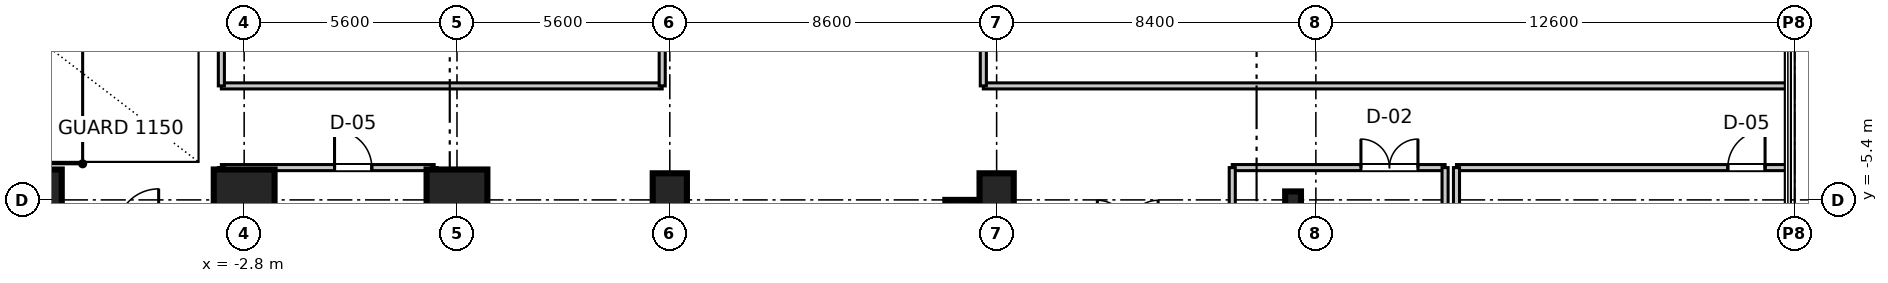
"""IFC4 building model, lengths in metres.
Left out: names, types, materials, properties, quantities, classifications, styles, units other than length and angle.
Written with IfcOpenShell. Run it as: python <this file> out.ifc"""

import sys

from ifc_helpers import new_model, si_unit, direction, frame, frame_2d, origin, origin_2d, place, context, subcontext, project, spatial, rectangle, i_section, extrude, source, transform, mapped, element, fill, save


model = new_model("IFC4")
c1 = context("Model", 3, precision=1e-05, world=origin(), true_north=direction((0.0, 1.0)))
c2 = subcontext(c1, "Body", "Model", "MODEL_VIEW")
j1 = project(units=[si_unit("LENGTHUNIT", "METRE"), si_unit("PLANEANGLEUNIT", "RADIAN")], contexts=[c1])
p1 = place(None, origin())
s1 = spatial("IfcSite", under=j1, at=p1, CompositionType="ELEMENT")
p2 = place(p1, origin())
s2 = spatial("IfcBuilding", under=s1, at=p2, CompositionType="ELEMENT")
p3 = place(p2, frame((0.0, 0.0, 5.4)))
s3 = spatial("IfcBuildingStorey", under=s2, at=p3, CompositionType="ELEMENT", Elevation=5.4)
m1 = source(origin(), c2, "Body", "SweptSolid", [
    extrude(rectangle(XDim=1.6, YDim=1.6, at=origin_2d()), origin(), (0.0, 0.0, 1.0), 5.355),
])
for number, where, z_axis, x_axis in (
    (1, (-8.4, -5.4, 0.0), (0.0, 0.0, 1.0), (1.0, 0.0, 0.0)),
    (2, (-2.8, -5.4, 0.0), (0.0, 0.0, 1.0), (1.0, 0.0, 0.0)),
    (3, (2.8, -5.4, 0.0), (0.0, 0.0, 1.0), (1.0, 0.0, 0.0)),
):
    element("IfcColumn", number, at=place(p3, frame(where, z_axis=z_axis, x_axis=x_axis)), inside=s3, PredefinedType="COLUMN", context=c2, shape_type="MappedRepresentation", body=[
        mapped(m1, transform((0.0, 0.0, 0.0), scale=1.0)),
    ])
m2 = source(origin(), c2, "Body", "SweptSolid", [
    extrude(rectangle(XDim=0.9, YDim=1.4, at=origin_2d()), origin(), (0.0, 0.0, 1.0), 5.355),
])
for number, where, z_axis, x_axis in (
    (4, (8.4, -5.4, 0.0), (0.0, 0.0, 1.0), (1.0, 0.0, 0.0)),
    (5, (17.0, -5.4, 0.0), (0.0, 0.0, 1.0), (1.0, 0.0, 0.0)),
):
    element("IfcColumn", number, at=place(p3, frame(where, z_axis=z_axis, x_axis=x_axis)), inside=s3, PredefinedType="PILASTER", context=c2, shape_type="MappedRepresentation", body=[
        mapped(m2, transform((0.0, 0.0, 0.0), scale=1.0)),
    ])
m3 = source(origin(), c2, "Body", "SweptSolid", [
    extrude(i_section(OverallWidth=0.416, OverallDepth=0.446, WebThickness=0.025, FlangeThickness=0.04, at=origin_2d()), origin(), (0.0, 0.0, 1.0), 5.355),
])
p4 = place(p3, frame((24.8, -5.4, 0.0), z_axis=(0.0, 0.0, 1.0), x_axis=(1.0, 0.0, 0.0)))
e6 = element("IfcColumn", 6, at=p4, inside=s3, PredefinedType="COLUMN", context=c2, shape_type="MappedRepresentation", body=[
    mapped(m3, transform((0.0, 0.0, 0.0), scale=1.0)),
])
m4 = source(origin(), c2, "Body", "SweptSolid", [
    extrude(rectangle(XDim=11.6, YDim=0.8, at=frame_2d((5.8, 0.0))), origin(), (0.0, 0.0, 1.0), 5.08),
])
p5 = place(p3, frame((16.05, -17.0, 0.0), z_axis=(0.0, 0.0, 1.0), x_axis=(0.0, 1.0, 0.0)))
e7 = element("IfcWall", 7, at=p5, inside=s3, PredefinedType="SHEAR", context=c2, shape_type="MappedRepresentation", body=[
    mapped(m4, transform((0.0, 0.0, 0.0), scale=1.0)),
])
m5 = source(origin(), c2, "Body", "SweptSolid", [
    extrude(rectangle(XDim=5.6, YDim=0.16, at=frame_2d((2.8, 0.0))), origin(), (0.0, 0.0, 1.0), 3.4),
])
p6 = place(p3, frame((23.2, -4.55, 0.0), z_axis=(0.0, 0.0, 1.0), x_axis=(1.0, 0.0, 0.0)))
e8 = element("IfcWall", 8, at=p6, inside=s3, PredefinedType="PARTITIONING", context=c2, shape_type="MappedRepresentation", body=[
    mapped(m5, transform((0.0, 0.0, 0.0), scale=1.0)),
])
p7 = place(p6, frame((3.386, 0.0, 0.0)))
e9 = element("IfcOpeningElement", 9, at=p7, cuts=e8, PredefinedType="OPENING", context=c2, shape_type="SweptSolid", body=[
    extrude(rectangle(XDim=1.5, YDim=2.15, at=frame_2d((0.75, 1.075))), frame((0.0, 0.09, 0.0), z_axis=(0.0, -1.0, 0.0), x_axis=(1.0, 0.0, 0.0)), (0.0, 0.0, 1.0), 0.18),
])
m6 = source(origin(), c2, "Body", "SweptSolid", [
    extrude(rectangle(XDim=19.21, YDim=0.16, at=frame_2d((9.605, 0.0))), origin(), (0.0, 0.0, 1.0), 3.4),
])
for number, where, z_axis, x_axis in (
    (10, (23.2, -23.76, 0.0), (0.0, 0.0, 1.0), (0.0, 1.0, 0.0)),
    (11, (28.8, -23.76, 0.0), (0.0, 0.0, 1.0), (0.0, 1.0, 0.0)),
):
    element("IfcWall", number, at=place(p3, frame(where, z_axis=z_axis, x_axis=x_axis)), inside=s3, PredefinedType="PARTITIONING", context=c2, shape_type="MappedRepresentation", body=[
        mapped(m6, transform((0.0, 0.0, 0.0), scale=1.0)),
    ])
m7 = source(origin(), c2, "Body", "SweptSolid", [
    extrude(rectangle(XDim=11.6, YDim=0.16, at=frame_2d((5.8, 0.0))), origin(), (0.0, 0.0, 1.0), 3.4),
])
p8 = place(p3, frame((-3.4, -2.4, 0.0), z_axis=(0.0, 0.0, 1.0), x_axis=(1.0, 0.0, 0.0)))
e12 = element("IfcWall", 12, at=p8, inside=s3, PredefinedType="PARTITIONING", context=c2, shape_type="MappedRepresentation", body=[
    mapped(m7, transform((0.0, 0.0, 0.0), scale=1.0)),
])
m8 = source(origin(), c2, "Body", "SweptSolid", [
    extrude(rectangle(XDim=4.8, YDim=0.16, at=frame_2d((2.4, 0.0))), origin(), (0.0, 0.0, 1.0), 3.4),
])
for number, where, z_axis, x_axis in (
    (13, (-3.4, -2.4, 0.0), (0.0, 0.0, 1.0), (0.0, 1.0, 0.0)),
    (14, (8.2, -2.4, 0.0), (0.0, 0.0, 1.0), (0.0, 1.0, 0.0)),
):
    element("IfcWall", number, at=place(p3, frame(where, z_axis=z_axis, x_axis=x_axis)), inside=s3, PredefinedType="PARTITIONING", context=c2, shape_type="MappedRepresentation", body=[
        mapped(m8, transform((0.0, 0.0, 0.0), scale=1.0)),
    ])
m9 = source(origin(), c2, "Body", "SweptSolid", [
    extrude(rectangle(XDim=21.11, YDim=0.16, at=frame_2d((10.555, 0.0))), origin(), (0.0, 0.0, 1.0), 3.4),
])
p9 = place(p3, frame((16.65, -2.4, 0.0), z_axis=(0.0, 0.0, 1.0), x_axis=(1.0, 0.0, 0.0)))
e15 = element("IfcWall", 15, at=p9, inside=s3, PredefinedType="PARTITIONING", context=c2, shape_type="MappedRepresentation", body=[
    mapped(m9, transform((0.0, 0.0, 0.0), scale=1.0)),
])
p10 = place(p3, frame((16.65, -2.4, 0.0), z_axis=(0.0, 0.0, 1.0), x_axis=(0.0, 1.0, 0.0)))
e16 = element("IfcWall", 16, at=p10, inside=s3, PredefinedType="PARTITIONING", context=c2, shape_type="MappedRepresentation", body=[
    mapped(m8, transform((0.0, 0.0, 0.0), scale=1.0)),
])
m10 = source(origin(), c2, "Body", "SweptSolid", [
    extrude(rectangle(XDim=8.66, YDim=0.16, at=frame_2d((4.33, 0.0))), origin(), (0.0, 0.0, 1.0), 3.4),
])
p11 = place(p3, frame((29.1, -4.55, 0.0), z_axis=(0.0, 0.0, 1.0), x_axis=(1.0, 0.0, 0.0)))
e17 = element("IfcWall", 17, at=p11, inside=s3, PredefinedType="PARTITIONING", context=c2, shape_type="MappedRepresentation", body=[
    mapped(m10, transform((0.0, 0.0, 0.0), scale=1.0)),
])
p12 = place(p11, frame((7.14, 0.0, 0.0)))
e18 = element("IfcOpeningElement", 18, at=p12, cuts=e17, PredefinedType="OPENING", context=c2, shape_type="SweptSolid", body=[
    extrude(rectangle(XDim=0.98, YDim=2.1, at=frame_2d((0.49, 1.05))), frame((0.0, 0.09, 0.0), z_axis=(0.0, -1.0, 0.0), x_axis=(1.0, 0.0, 0.0)), (0.0, 0.0, 1.0), 0.18),
])
m11 = source(origin(), c2, "Body", "SweptSolid", [
    extrude(rectangle(XDim=7.85, YDim=0.16, at=frame_2d((3.925, 0.0))), origin(), (0.0, 0.0, 1.0), 3.4),
])
p13 = place(p3, frame((29.1, -12.4, 0.0), z_axis=(0.0, 0.0, 1.0), x_axis=(0.0, 1.0, 0.0)))
e19 = element("IfcWall", 19, at=p13, inside=s3, PredefinedType="PARTITIONING", context=c2, shape_type="MappedRepresentation", body=[
    mapped(m11, transform((0.0, 0.0, 0.0), scale=1.0)),
])
m12 = source(origin(), c2, "Body", "SweptSolid", [
    extrude(rectangle(XDim=5.6, YDim=0.16, at=frame_2d((2.8, 0.0))), origin(), (0.0, 0.0, 1.0), 3.4),
])
p14 = place(p3, frame((-3.4, -4.55, 0.0), z_axis=(0.0, 0.0, 1.0), x_axis=(1.0, 0.0, 0.0)))
e20 = element("IfcWall", 20, at=p14, inside=s3, PredefinedType="PARTITIONING", context=c2, shape_type="MappedRepresentation", body=[
    mapped(m12, transform((0.0, 0.0, 0.0), scale=1.0)),
])
p15 = place(p14, frame((2.978, 0.0, 0.0)))
e21 = element("IfcOpeningElement", 21, at=p15, cuts=e20, PredefinedType="OPENING", context=c2, shape_type="SweptSolid", body=[
    extrude(rectangle(XDim=0.98, YDim=2.1, at=frame_2d((0.49, 1.05))), frame((0.0, 0.09, 0.0), z_axis=(0.0, -1.0, 0.0), x_axis=(1.0, 0.0, 0.0)), (0.0, 0.0, 1.0), 0.18),
])
m13 = source(origin(), c2, "Body", "SweptSolid", [
    extrude(rectangle(XDim=5.25, YDim=0.16, at=frame_2d((2.625, 0.0))), origin(), (0.0, 0.0, 1.0), 3.4),
])
for number, where, z_axis, x_axis in (
    (22, (-3.4, -9.8, 0.0), (0.0, 0.0, 1.0), (0.0, 1.0, 0.0)),
    (23, (2.2, -9.8, 0.0), (0.0, 0.0, 1.0), (0.0, 1.0, 0.0)),
):
    element("IfcWall", number, at=place(p3, frame(where, z_axis=z_axis, x_axis=x_axis)), inside=s3, PredefinedType="PARTITIONING", context=c2, shape_type="MappedRepresentation", body=[
        mapped(m13, transform((0.0, 0.0, 0.0), scale=1.0)),
    ])
m14 = source(origin(), c2, "Body", "SweptSolid", [
    extrude(rectangle(XDim=1.5, YDim=2.15, at=frame_2d((0.75, 1.075))), frame((0.0, 0.025, 0.0), z_axis=(0.0, -1.0, 0.0), x_axis=(1.0, 0.0, 0.0)), (0.0, 0.0, 1.0), 0.05),
])
p16 = place(p7, frame((1.5, 0.0, 0.0), z_axis=(0.0, 0.0, 1.0), x_axis=(-1.0, 0.0, 0.0)))
e24 = element("IfcDoor", 24, at=p16, inside=s3, OperationType="DOUBLE_DOOR_SINGLE_SWING", PredefinedType="DOOR", context=c2, shape_type="MappedRepresentation", body=[
    mapped(m14, transform((0.0, 0.0, 0.0), scale=1.0)),
])
fill(e9, e24)
m15 = source(origin(), c2, "Body", "SweptSolid", [
    extrude(rectangle(XDim=0.98, YDim=2.1, at=frame_2d((0.49, 1.05))), frame((0.0, 0.025, 0.0), z_axis=(0.0, -1.0, 0.0), x_axis=(1.0, 0.0, 0.0)), (0.0, 0.0, 1.0), 0.05),
])
p17 = place(p12, frame((0.98, 0.0, 0.0), z_axis=(0.0, 0.0, 1.0), x_axis=(-1.0, 0.0, 0.0)))
e25 = element("IfcDoor", 25, at=p17, inside=s3, OperationType="SINGLE_SWING_RIGHT", PredefinedType="DOOR", context=c2, shape_type="MappedRepresentation", body=[
    mapped(m15, transform((0.0, 0.0, 0.0), scale=1.0)),
])
fill(e18, e25)
p18 = place(p15, frame((0.98, 0.0, 0.0), z_axis=(0.0, 0.0, 1.0), x_axis=(-1.0, 0.0, 0.0)))
e26 = element("IfcDoor", 26, at=p18, inside=s3, OperationType="SINGLE_SWING_LEFT", PredefinedType="DOOR", context=c2, shape_type="MappedRepresentation", body=[
    mapped(m15, transform((0.0, 0.0, 0.0), scale=1.0)),
])
fill(e21, e26)
save(model, sys.argv[1])
